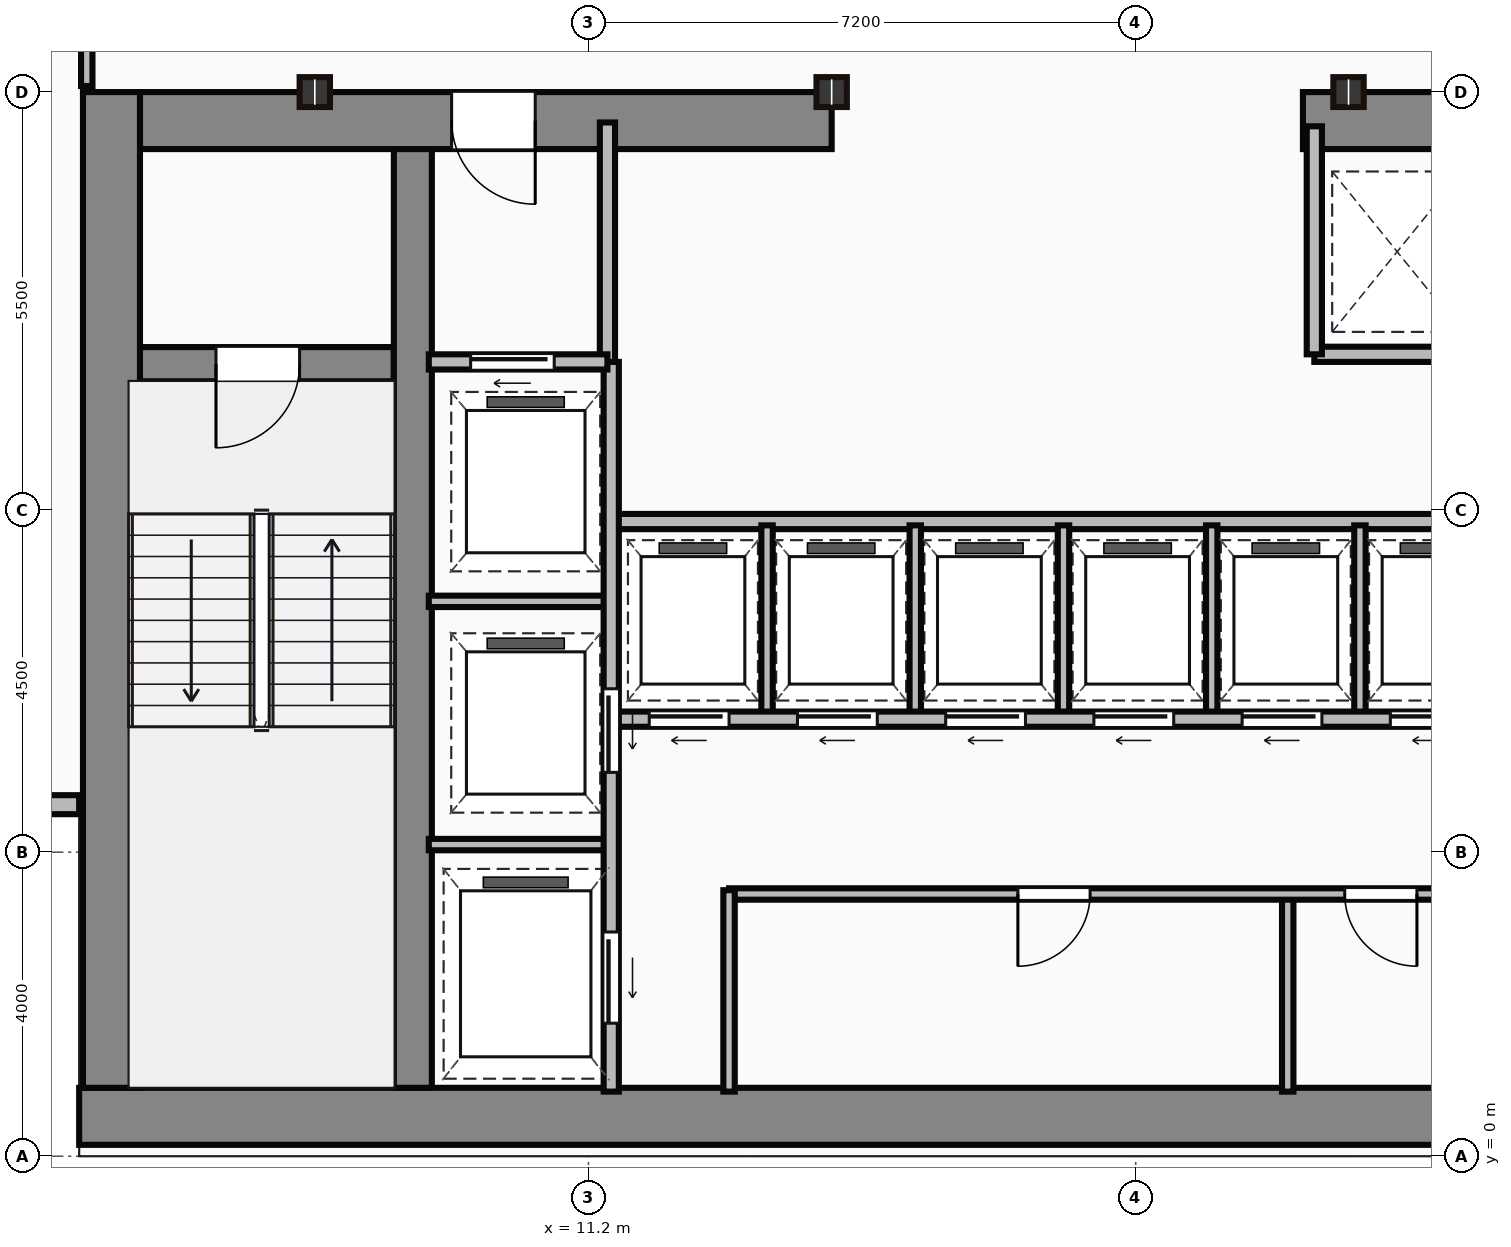
"""IFC4 building model, lengths in metres.
Left out: names, types, materials, properties, quantities, classifications, styles, units other than length and angle.
Written with IfcOpenShell. Run it as: python <this file> out.ifc"""

import sys

from ifc_helpers import new_model, si_unit, direction, frame, frame_2d, origin, origin_2d, place, context, subcontext, project, spatial, rectangle, i_section, extrude, source, transform, mapped, element, fill, save


model = new_model("IFC4")
c1 = context("Model", 3, precision=1e-05, world=origin(), true_north=direction((0.0, 1.0)))
c2 = subcontext(c1, "Body", "Model", "MODEL_VIEW")
j1 = project(units=[si_unit("LENGTHUNIT", "METRE"), si_unit("PLANEANGLEUNIT", "RADIAN")], contexts=[c1])
p1 = place(None, origin())
s1 = spatial("IfcSite", under=j1, at=p1, CompositionType="ELEMENT")
p2 = place(p1, origin())
s2 = spatial("IfcBuilding", under=s1, at=p2, CompositionType="ELEMENT")
p3 = place(p2, frame((0.0, 0.0, 121.5)))
s3 = spatial("IfcBuildingStorey", under=s2, at=p3, CompositionType="ELEMENT", Elevation=121.5)
m1 = source(origin(), c2, "Body", "SweptSolid", [
    extrude(rectangle(XDim=29.5, YDim=0.75, at=frame_2d((14.75, 0.0))), origin(), (0.0, 0.0, 1.0), 3.65),
])
p4 = place(p3, frame((4.5, 0.525, 0.0), z_axis=(0.0, 0.0, 1.0), x_axis=(1.0, 0.0, 0.0)))
e1 = element("IfcWall", 1, at=p4, inside=s3, PredefinedType="SHEAR", context=c2, shape_type="MappedRepresentation", body=[
    mapped(m1, transform((0.0, 0.0, 0.0))),
])
m2 = source(origin(), c2, "Body", "SweptSolid", [
    extrude(rectangle(XDim=13.1, YDim=0.75, at=frame_2d((6.55, 0.0))), origin(), (0.0, 0.0, 1.0), 3.65),
])
p5 = place(p3, frame((4.925, 0.9, 0.0), z_axis=(0.0, 0.0, 1.0), x_axis=(0.0, 1.0, 0.0)))
e2 = element("IfcWall", 2, at=p5, inside=s3, PredefinedType="SHEAR", context=c2, shape_type="MappedRepresentation", body=[
    mapped(m2, transform((0.0, 0.0, 0.0))),
])
m3 = source(origin(), c2, "Body", "SweptSolid", [
    extrude(rectangle(XDim=9.1, YDim=0.75, at=frame_2d((4.55, 0.0))), origin(), (0.0, 0.0, 1.0), 3.65),
])
p6 = place(p3, frame((5.3, 13.625, 0.0), z_axis=(0.0, 0.0, 1.0), x_axis=(1.0, 0.0, 0.0)))
e3 = element("IfcWall", 3, at=p6, inside=s3, PredefinedType="SHEAR", context=c2, shape_type="MappedRepresentation", body=[
    mapped(m3, transform((0.0, 0.0, 0.0))),
])
p7 = place(p6, frame((4.1, 0.0, 0.0)))
e4 = element("IfcOpeningElement", 4, at=p7, cuts=e3, PredefinedType="OPENING", context=c2, shape_type="SweptSolid", body=[
    extrude(rectangle(XDim=1.1, YDim=2.15, at=frame_2d((0.55, 1.075))), frame((0.0, 0.385, 0.0), z_axis=(0.0, -1.0, 0.0), x_axis=(1.0, 0.0, 0.0)), (0.0, 0.0, 1.0), 0.77),
])
m4 = source(origin(), c2, "Body", "SweptSolid", [
    extrude(rectangle(XDim=12.6, YDim=0.75, at=frame_2d((6.3, 0.0))), origin(), (0.0, 0.0, 1.0), 3.65),
])
p8 = place(p3, frame((20.6, 13.625, 0.0), z_axis=(0.0, 0.0, 1.0), x_axis=(1.0, 0.0, 0.0)))
e5 = element("IfcWall", 5, at=p8, inside=s3, PredefinedType="SHEAR", context=c2, shape_type="MappedRepresentation", body=[
    mapped(m4, transform((0.0, 0.0, 0.0))),
])
p9 = place(p8, frame((9.25, 0.0, 0.0)))
e6 = element("IfcOpeningElement", 6, at=p9, cuts=e5, PredefinedType="OPENING", context=c2, shape_type="SweptSolid", body=[
    extrude(rectangle(XDim=1.1, YDim=2.15, at=frame_2d((0.55, 1.075))), frame((0.0, 0.385, 0.0), z_axis=(0.0, -1.0, 0.0), x_axis=(1.0, 0.0, 0.0)), (0.0, 0.0, 1.0), 0.77),
])
m5 = source(origin(), c2, "Body", "SweptSolid", [
    extrude(rectangle(XDim=12.35, YDim=0.5, at=frame_2d((6.175, 0.0))), origin(), (0.0, 0.0, 1.0), 3.65),
])
p10 = place(p3, frame((8.89, 0.9, 0.0), z_axis=(0.0, 0.0, 1.0), x_axis=(0.0, 1.0, 0.0)))
e7 = element("IfcWall", 7, at=p10, inside=s3, PredefinedType="SHEAR", context=c2, shape_type="MappedRepresentation", body=[
    mapped(m5, transform((0.0, 0.0, 0.0))),
])
m6 = source(origin(), c2, "Body", "SweptSolid", [
    extrude(rectangle(XDim=3.39, YDim=0.45, at=frame_2d((1.695, 0.0))), origin(), (0.0, 0.0, 1.0), 3.65),
])
p11 = place(p3, frame((5.25, 10.42, 0.0), z_axis=(0.0, 0.0, 1.0), x_axis=(1.0, 0.0, 0.0)))
e8 = element("IfcWall", 8, at=p11, inside=s3, PredefinedType="SHEAR", context=c2, shape_type="MappedRepresentation", body=[
    mapped(m6, transform((0.0, 0.0, 0.0))),
])
p12 = place(p11, frame((1.05, 0.0, 0.0)))
e9 = element("IfcOpeningElement", 9, at=p12, cuts=e8, PredefinedType="OPENING", context=c2, shape_type="SweptSolid", body=[
    extrude(rectangle(XDim=1.1, YDim=2.15, at=frame_2d((0.55, 1.075))), frame((0.0, 0.235, 0.0), z_axis=(0.0, -1.0, 0.0), x_axis=(1.0, 0.0, 0.0)), (0.0, 0.0, 1.0), 0.47),
])
m7 = source(origin(), c2, "Body", "SweptSolid", [
    extrude(i_section(OverallWidth=0.399, OverallDepth=0.393, WebThickness=0.023, FlangeThickness=0.037, at=origin_2d()), origin(), (0.0, 0.0, 1.0), 3.65),
])
for number, where, z_axis, x_axis in (
    (10, (7.6, 14.0, 0.0), (0.0, 0.0, 1.0), (1.0, 0.0, 0.0)),
    (11, (14.4, 14.0, 0.0), (0.0, 0.0, 1.0), (1.0, 0.0, 0.0)),
    (12, (21.2, 14.0, 0.0), (0.0, 0.0, 1.0), (1.0, 0.0, 0.0)),
):
    element("IfcColumn", number, at=place(p3, frame(where, z_axis=z_axis, x_axis=x_axis)), inside=s3, PredefinedType="COLUMN", context=c2, shape_type="MappedRepresentation", body=[
        mapped(m7, transform((0.0, 0.0, 0.0))),
    ])
m8 = source(origin(), c2, "Body", "SweptSolid", [
    extrude(rectangle(XDim=4.5, YDim=0.25, at=frame_2d((2.25, 0.0))), origin(), (0.0, 0.0, 1.0), 3.4),
])
p13 = place(p3, frame((0.0, 4.625, 0.0), z_axis=(0.0, 0.0, 1.0), x_axis=(1.0, 0.0, 0.0)))
e13 = element("IfcWall", 13, at=p13, inside=s3, PredefinedType="STANDARD", context=c2, shape_type="MappedRepresentation", body=[
    mapped(m8, transform((0.0, 0.0, 0.0))),
])
m9 = source(origin(), c2, "Body", "SweptSolid", [
    extrude(rectangle(XDim=3.18, YDim=0.2, at=frame_2d((1.59, 0.0))), origin(), (0.0, 0.0, 1.0), 3.4),
])
p14 = place(p3, frame((11.45, 10.42, 0.0), z_axis=(0.0, 0.0, 1.0), x_axis=(0.0, 1.0, 0.0)))
e14 = element("IfcWall", 14, at=p14, inside=s3, PredefinedType="PARTITIONING", context=c2, shape_type="MappedRepresentation", body=[
    mapped(m9, transform((0.0, 0.0, 0.0))),
])
m10 = source(origin(), c2, "Body", "SweptSolid", [
    extrude(rectangle(XDim=2.35, YDim=0.2, at=frame_2d((1.175, 0.0))), origin(), (0.0, 0.0, 1.0), 3.4),
])
p15 = place(p3, frame((9.1, 10.45, 0.0), z_axis=(0.0, 0.0, 1.0), x_axis=(1.0, 0.0, 0.0)))
e15 = element("IfcWall", 15, at=p15, inside=s3, PredefinedType="PARTITIONING", context=c2, shape_type="MappedRepresentation", body=[
    mapped(m10, transform((0.0, 0.0, 0.0))),
])
p16 = place(p15, frame((0.55, 0.0, 0.0)))
e16 = element("IfcOpeningElement", 16, at=p16, cuts=e15, PredefinedType="OPENING", context=c2, shape_type="SweptSolid", body=[
    extrude(rectangle(XDim=1.1, YDim=2.15, at=frame_2d((0.55, 1.075))), frame((0.0, 0.11, 0.0), z_axis=(0.0, -1.0, 0.0), x_axis=(1.0, 0.0, 0.0)), (0.0, 0.0, 1.0), 0.22),
])
m11 = source(origin(), c2, "Body", "SweptSolid", [
    extrude(rectangle(XDim=9.6, YDim=0.2, at=frame_2d((4.8, 0.0))), origin(), (0.0, 0.0, 1.0), 3.4),
])
p17 = place(p3, frame((11.5, 0.85, 0.0), z_axis=(0.0, 0.0, 1.0), x_axis=(0.0, 1.0, 0.0)))
e17 = element("IfcWall", 17, at=p17, inside=s3, PredefinedType="PARTITIONING", context=c2, shape_type="MappedRepresentation", body=[
    mapped(m11, transform((0.0, 0.0, 0.0))),
])
p18 = place(p17, frame((4.2, 0.0, 0.0)))
e18 = element("IfcOpeningElement", 18, at=p18, cuts=e17, PredefinedType="OPENING", context=c2, shape_type="SweptSolid", body=[
    extrude(rectangle(XDim=1.1, YDim=2.15, at=frame_2d((0.55, 1.075))), frame((0.0, 0.11, 0.0), z_axis=(0.0, -1.0, 0.0), x_axis=(1.0, 0.0, 0.0)), (0.0, 0.0, 1.0), 0.22),
])
p19 = place(p17, frame((0.9, 0.0, 0.0)))
e19 = element("IfcOpeningElement", 19, at=p19, cuts=e17, PredefinedType="OPENING", context=c2, shape_type="SweptSolid", body=[
    extrude(rectangle(XDim=1.2, YDim=2.15, at=frame_2d((0.6, 1.075))), frame((0.0, 0.11, 0.0), z_axis=(0.0, -1.0, 0.0), x_axis=(1.0, 0.0, 0.0)), (0.0, 0.0, 1.0), 0.22),
])
m12 = source(origin(), c2, "Body", "SweptSolid", [
    extrude(rectangle(XDim=2.4, YDim=0.15, at=frame_2d((1.2, 0.0))), origin(), (0.0, 0.0, 1.0), 3.4),
])
for number, where, z_axis, x_axis in (
    (20, (9.1, 4.1, 0.0), (0.0, 0.0, 1.0), (1.0, 0.0, 0.0)),
    (21, (9.1, 7.3, 0.0), (0.0, 0.0, 1.0), (1.0, 0.0, 0.0)),
):
    element("IfcWall", number, at=place(p3, frame(where, z_axis=z_axis, x_axis=x_axis)), inside=s3, PredefinedType="PARTITIONING", context=c2, shape_type="MappedRepresentation", body=[
        mapped(m12, transform((0.0, 0.0, 0.0))),
    ])
m13 = source(origin(), c2, "Body", "SweptSolid", [
    extrude(rectangle(XDim=2.65, YDim=0.15, at=frame_2d((1.325, 0.0))), origin(), (0.0, 0.0, 1.0), 3.4),
])
p20 = place(p3, frame((13.05, 0.85, 0.0), z_axis=(0.0, 0.0, 1.0), x_axis=(0.0, 1.0, 0.0)))
e22 = element("IfcWall", 22, at=p20, inside=s3, PredefinedType="PARTITIONING", context=c2, shape_type="MappedRepresentation", body=[
    mapped(m13, transform((0.0, 0.0, 0.0))),
])
m14 = source(origin(), c2, "Body", "SweptSolid", [
    extrude(rectangle(XDim=10.35, YDim=0.15, at=frame_2d((5.175, 0.0))), origin(), (0.0, 0.0, 1.0), 3.4),
])
p21 = place(p3, frame((13.05, 3.45, 0.0), z_axis=(0.0, 0.0, 1.0), x_axis=(1.0, 0.0, 0.0)))
e23 = element("IfcWall", 23, at=p21, inside=s3, PredefinedType="PARTITIONING", context=c2, shape_type="MappedRepresentation", body=[
    mapped(m14, transform((0.0, 0.0, 0.0))),
])
p22 = place(p21, frame((3.8, 0.0, 0.0)))
e24 = element("IfcOpeningElement", 24, at=p22, cuts=e23, PredefinedType="OPENING", context=c2, shape_type="SweptSolid", body=[
    extrude(rectangle(XDim=0.95, YDim=2.15, at=frame_2d((0.475, 1.075))), frame((0.0, 0.085, 0.0), z_axis=(0.0, -1.0, 0.0), x_axis=(1.0, 0.0, 0.0)), (0.0, 0.0, 1.0), 0.17),
])
p23 = place(p21, frame((8.1, 0.0, 0.0)))
e25 = element("IfcOpeningElement", 25, at=p23, cuts=e23, PredefinedType="OPENING", context=c2, shape_type="SweptSolid", body=[
    extrude(rectangle(XDim=0.95, YDim=2.15, at=frame_2d((0.475, 1.075))), frame((0.0, 0.085, 0.0), z_axis=(0.0, -1.0, 0.0), x_axis=(1.0, 0.0, 0.0)), (0.0, 0.0, 1.0), 0.17),
])
m15 = source(origin(), c2, "Body", "SweptSolid", [
    extrude(rectangle(XDim=2.6, YDim=0.15, at=frame_2d((1.3, 0.0))), origin(), (0.0, 0.0, 1.0), 3.4),
])
p24 = place(p3, frame((20.4, 0.85, 0.0), z_axis=(0.0, 0.0, 1.0), x_axis=(0.0, 1.0, 0.0)))
e26 = element("IfcWall", 26, at=p24, inside=s3, PredefinedType="PARTITIONING", context=c2, shape_type="MappedRepresentation", body=[
    mapped(m15, transform((0.0, 0.0, 0.0))),
])
m16 = source(origin(), c2, "Body", "SweptSolid", [
    extrude(rectangle(XDim=11.85, YDim=0.2, at=frame_2d((5.925, 0.0))), origin(), (0.0, 0.0, 1.0), 3.4),
])
p25 = place(p3, frame((11.55, 5.75, 0.0), z_axis=(0.0, 0.0, 1.0), x_axis=(1.0, 0.0, 0.0)))
e27 = element("IfcWall", 27, at=p25, inside=s3, PredefinedType="PARTITIONING", context=c2, shape_type="MappedRepresentation", body=[
    mapped(m16, transform((0.0, 0.0, 0.0))),
])
p26 = place(p25, frame((0.45, 0.0, 0.0)))
e28 = element("IfcOpeningElement", 28, at=p26, cuts=e27, PredefinedType="OPENING", context=c2, shape_type="SweptSolid", body=[
    extrude(rectangle(XDim=1.05, YDim=2.15, at=frame_2d((0.525, 1.075))), frame((0.0, 0.11, 0.0), z_axis=(0.0, -1.0, 0.0), x_axis=(1.0, 0.0, 0.0)), (0.0, 0.0, 1.0), 0.22),
])
p27 = place(p25, frame((2.4, 0.0, 0.0)))
e29 = element("IfcOpeningElement", 29, at=p27, cuts=e27, PredefinedType="OPENING", context=c2, shape_type="SweptSolid", body=[
    extrude(rectangle(XDim=1.05, YDim=2.15, at=frame_2d((0.525, 1.075))), frame((0.0, 0.11, 0.0), z_axis=(0.0, -1.0, 0.0), x_axis=(1.0, 0.0, 0.0)), (0.0, 0.0, 1.0), 0.22),
])
p28 = place(p25, frame((4.35, 0.0, 0.0)))
e30 = element("IfcOpeningElement", 30, at=p28, cuts=e27, PredefinedType="OPENING", context=c2, shape_type="SweptSolid", body=[
    extrude(rectangle(XDim=1.05, YDim=2.15, at=frame_2d((0.525, 1.075))), frame((0.0, 0.11, 0.0), z_axis=(0.0, -1.0, 0.0), x_axis=(1.0, 0.0, 0.0)), (0.0, 0.0, 1.0), 0.22),
])
p29 = place(p25, frame((6.3, 0.0, 0.0)))
e31 = element("IfcOpeningElement", 31, at=p29, cuts=e27, PredefinedType="OPENING", context=c2, shape_type="SweptSolid", body=[
    extrude(rectangle(XDim=1.05, YDim=2.15, at=frame_2d((0.525, 1.075))), frame((0.0, 0.11, 0.0), z_axis=(0.0, -1.0, 0.0), x_axis=(1.0, 0.0, 0.0)), (0.0, 0.0, 1.0), 0.22),
])
p30 = place(p25, frame((8.25, 0.0, 0.0)))
e32 = element("IfcOpeningElement", 32, at=p30, cuts=e27, PredefinedType="OPENING", context=c2, shape_type="SweptSolid", body=[
    extrude(rectangle(XDim=1.05, YDim=2.15, at=frame_2d((0.525, 1.075))), frame((0.0, 0.11, 0.0), z_axis=(0.0, -1.0, 0.0), x_axis=(1.0, 0.0, 0.0)), (0.0, 0.0, 1.0), 0.22),
])
p31 = place(p25, frame((10.2, 0.0, 0.0)))
e33 = element("IfcOpeningElement", 33, at=p31, cuts=e27, PredefinedType="OPENING", context=c2, shape_type="SweptSolid", body=[
    extrude(rectangle(XDim=1.05, YDim=2.15, at=frame_2d((0.525, 1.075))), frame((0.0, 0.11, 0.0), z_axis=(0.0, -1.0, 0.0), x_axis=(1.0, 0.0, 0.0)), (0.0, 0.0, 1.0), 0.22),
])
p32 = place(p3, frame((11.55, 8.35, 0.0), z_axis=(0.0, 0.0, 1.0), x_axis=(1.0, 0.0, 0.0)))
e34 = element("IfcWall", 34, at=p32, inside=s3, PredefinedType="PARTITIONING", context=c2, shape_type="MappedRepresentation", body=[
    mapped(m16, transform((0.0, 0.0, 0.0))),
])
m17 = source(origin(), c2, "Body", "SweptSolid", [
    extrude(rectangle(XDim=2.5, YDim=0.15, at=frame_2d((1.25, 0.0))), origin(), (0.0, 0.0, 1.0), 3.4),
])
for number, where, z_axis, x_axis in (
    (35, (13.55, 5.8, 0.0), (0.0, 0.0, 1.0), (0.0, 1.0, 0.0)),
    (36, (15.5, 5.8, 0.0), (0.0, 0.0, 1.0), (0.0, 1.0, 0.0)),
    (37, (17.45, 5.8, 0.0), (0.0, 0.0, 1.0), (0.0, 1.0, 0.0)),
    (38, (19.4, 5.8, 0.0), (0.0, 0.0, 1.0), (0.0, 1.0, 0.0)),
    (39, (21.35, 5.8, 0.0), (0.0, 0.0, 1.0), (0.0, 1.0, 0.0)),
):
    element("IfcWall", number, at=place(p3, frame(where, z_axis=z_axis, x_axis=x_axis)), inside=s3, PredefinedType="PARTITIONING", context=c2, shape_type="MappedRepresentation", body=[
        mapped(m17, transform((0.0, 0.0, 0.0))),
    ])
m18 = source(origin(), c2, "Body", "SweptSolid", [
    extrude(rectangle(XDim=8.8, YDim=0.2, at=frame_2d((4.4, 0.0))), origin(), (0.0, 0.0, 1.0), 3.4),
])
p33 = place(p3, frame((20.75, 10.55, 0.0), z_axis=(0.0, 0.0, 1.0), x_axis=(1.0, 0.0, 0.0)))
e40 = element("IfcWall", 40, at=p33, inside=s3, PredefinedType="PARTITIONING", context=c2, shape_type="MappedRepresentation", body=[
    mapped(m18, transform((0.0, 0.0, 0.0))),
])
m19 = source(origin(), c2, "Body", "SweptSolid", [
    extrude(rectangle(XDim=3.0, YDim=0.2, at=frame_2d((1.5, 0.0))), origin(), (0.0, 0.0, 1.0), 3.4),
])
p34 = place(p3, frame((20.75, 10.55, 0.0), z_axis=(0.0, 0.0, 1.0), x_axis=(0.0, 1.0, 0.0)))
e41 = element("IfcWall", 41, at=p34, inside=s3, PredefinedType="PARTITIONING", context=c2, shape_type="MappedRepresentation", body=[
    mapped(m19, transform((0.0, 0.0, 0.0))),
])
m20 = source(origin(), c2, "Body", "SweptSolid", [
    extrude(rectangle(XDim=2.22, YDim=0.15, at=frame_2d((1.11, 0.0))), origin(), (0.0, 0.0, 1.0), 3.4),
])
p35 = place(p3, frame((4.6, 14.08, 0.0), z_axis=(0.0, 0.0, 1.0), x_axis=(0.0, 1.0, 0.0)))
e42 = element("IfcWall", 42, at=p35, inside=s3, PredefinedType="PARTITIONING", context=c2, shape_type="MappedRepresentation", body=[
    mapped(m20, transform((0.0, 0.0, 0.0))),
])
m21 = source(origin(), c2, "Body", "SweptSolid", [
    extrude(rectangle(XDim=1.1, YDim=2.15, at=frame_2d((0.55, 1.075))), frame((0.0, 0.025, 0.0), z_axis=(0.0, -1.0, 0.0), x_axis=(1.0, 0.0, 0.0)), (0.0, 0.0, 1.0), 0.05),
])
p36 = place(p12, frame((1.1, 0.0, 0.0), z_axis=(0.0, 0.0, 1.0), x_axis=(-1.0, 0.0, 0.0)))
e43 = element("IfcDoor", 43, at=p36, inside=s3, OperationType="SINGLE_SWING_LEFT", PredefinedType="DOOR", context=c2, shape_type="MappedRepresentation", body=[
    mapped(m21, transform((0.0, 0.0, 0.0))),
])
fill(e9, e43)
p37 = place(p7, origin())
e44 = element("IfcDoor", 44, at=p37, inside=s3, OperationType="SINGLE_SWING_RIGHT", PredefinedType="DOOR", context=c2, shape_type="MappedRepresentation", body=[
    mapped(m21, transform((0.0, 0.0, 0.0))),
])
fill(e4, e44)
p38 = place(p16, origin())
e45 = element("IfcDoor", 45, at=p38, inside=s3, OperationType="SLIDING_TO_LEFT", PredefinedType="DOOR", context=c2, shape_type="MappedRepresentation", body=[
    mapped(m21, transform((0.0, 0.0, 0.0))),
])
fill(e16, e45)
p39 = place(p18, frame((1.1, 0.0, 0.0), z_axis=(0.0, 0.0, 1.0), x_axis=(-1.0, 0.0, 0.0)))
e46 = element("IfcDoor", 46, at=p39, inside=s3, OperationType="SLIDING_TO_LEFT", PredefinedType="DOOR", context=c2, shape_type="MappedRepresentation", body=[
    mapped(m21, transform((0.0, 0.0, 0.0))),
])
fill(e18, e46)
m22 = source(origin(), c2, "Body", "SweptSolid", [
    extrude(rectangle(XDim=1.2, YDim=2.15, at=frame_2d((0.6, 1.075))), frame((0.0, 0.025, 0.0), z_axis=(0.0, -1.0, 0.0), x_axis=(1.0, 0.0, 0.0)), (0.0, 0.0, 1.0), 0.05),
])
p40 = place(p19, frame((1.2, 0.0, 0.0), z_axis=(0.0, 0.0, 1.0), x_axis=(-1.0, 0.0, 0.0)))
e47 = element("IfcDoor", 47, at=p40, inside=s3, OperationType="SLIDING_TO_LEFT", PredefinedType="DOOR", context=c2, shape_type="MappedRepresentation", body=[
    mapped(m22, transform((0.0, 0.0, 0.0))),
])
fill(e19, e47)
m23 = source(origin(), c2, "Body", "SweptSolid", [
    extrude(rectangle(XDim=0.95, YDim=2.15, at=frame_2d((0.475, 1.075))), frame((0.0, 0.025, 0.0), z_axis=(0.0, -1.0, 0.0), x_axis=(1.0, 0.0, 0.0)), (0.0, 0.0, 1.0), 0.05),
])
p41 = place(p22, origin())
e48 = element("IfcDoor", 48, at=p41, inside=s3, OperationType="SINGLE_SWING_LEFT", PredefinedType="DOOR", context=c2, shape_type="MappedRepresentation", body=[
    mapped(m23, transform((0.0, 0.0, 0.0))),
])
fill(e24, e48)
p42 = place(p23, origin())
e49 = element("IfcDoor", 49, at=p42, inside=s3, OperationType="SINGLE_SWING_RIGHT", PredefinedType="DOOR", context=c2, shape_type="MappedRepresentation", body=[
    mapped(m23, transform((0.0, 0.0, 0.0))),
])
fill(e25, e49)
m24 = source(origin(), c2, "Body", "SweptSolid", [
    extrude(rectangle(XDim=1.05, YDim=2.15, at=frame_2d((0.525, 1.075))), frame((0.0, 0.025, 0.0), z_axis=(0.0, -1.0, 0.0), x_axis=(1.0, 0.0, 0.0)), (0.0, 0.0, 1.0), 0.05),
])
p43 = place(p26, frame((1.05, 0.0, 0.0), z_axis=(0.0, 0.0, 1.0), x_axis=(-1.0, 0.0, 0.0)))
e50 = element("IfcDoor", 50, at=p43, inside=s3, OperationType="SLIDING_TO_LEFT", PredefinedType="DOOR", context=c2, shape_type="MappedRepresentation", body=[
    mapped(m24, transform((0.0, 0.0, 0.0))),
])
fill(e28, e50)
p44 = place(p27, frame((1.05, 0.0, 0.0), z_axis=(0.0, 0.0, 1.0), x_axis=(-1.0, 0.0, 0.0)))
e51 = element("IfcDoor", 51, at=p44, inside=s3, OperationType="SLIDING_TO_LEFT", PredefinedType="DOOR", context=c2, shape_type="MappedRepresentation", body=[
    mapped(m24, transform((0.0, 0.0, 0.0))),
])
fill(e29, e51)
p45 = place(p28, frame((1.05, 0.0, 0.0), z_axis=(0.0, 0.0, 1.0), x_axis=(-1.0, 0.0, 0.0)))
e52 = element("IfcDoor", 52, at=p45, inside=s3, OperationType="SLIDING_TO_LEFT", PredefinedType="DOOR", context=c2, shape_type="MappedRepresentation", body=[
    mapped(m24, transform((0.0, 0.0, 0.0))),
])
fill(e30, e52)
p46 = place(p29, frame((1.05, 0.0, 0.0), z_axis=(0.0, 0.0, 1.0), x_axis=(-1.0, 0.0, 0.0)))
e53 = element("IfcDoor", 53, at=p46, inside=s3, OperationType="SLIDING_TO_LEFT", PredefinedType="DOOR", context=c2, shape_type="MappedRepresentation", body=[
    mapped(m24, transform((0.0, 0.0, 0.0))),
])
fill(e31, e53)
p47 = place(p30, frame((1.05, 0.0, 0.0), z_axis=(0.0, 0.0, 1.0), x_axis=(-1.0, 0.0, 0.0)))
e54 = element("IfcDoor", 54, at=p47, inside=s3, OperationType="SLIDING_TO_LEFT", PredefinedType="DOOR", context=c2, shape_type="MappedRepresentation", body=[
    mapped(m24, transform((0.0, 0.0, 0.0))),
])
fill(e32, e54)
p48 = place(p31, frame((1.05, 0.0, 0.0), z_axis=(0.0, 0.0, 1.0), x_axis=(-1.0, 0.0, 0.0)))
e55 = element("IfcDoor", 55, at=p48, inside=s3, OperationType="SLIDING_TO_LEFT", PredefinedType="DOOR", context=c2, shape_type="MappedRepresentation", body=[
    mapped(m24, transform((0.0, 0.0, 0.0))),
])
fill(e33, e55)
save(model, sys.argv[1])
